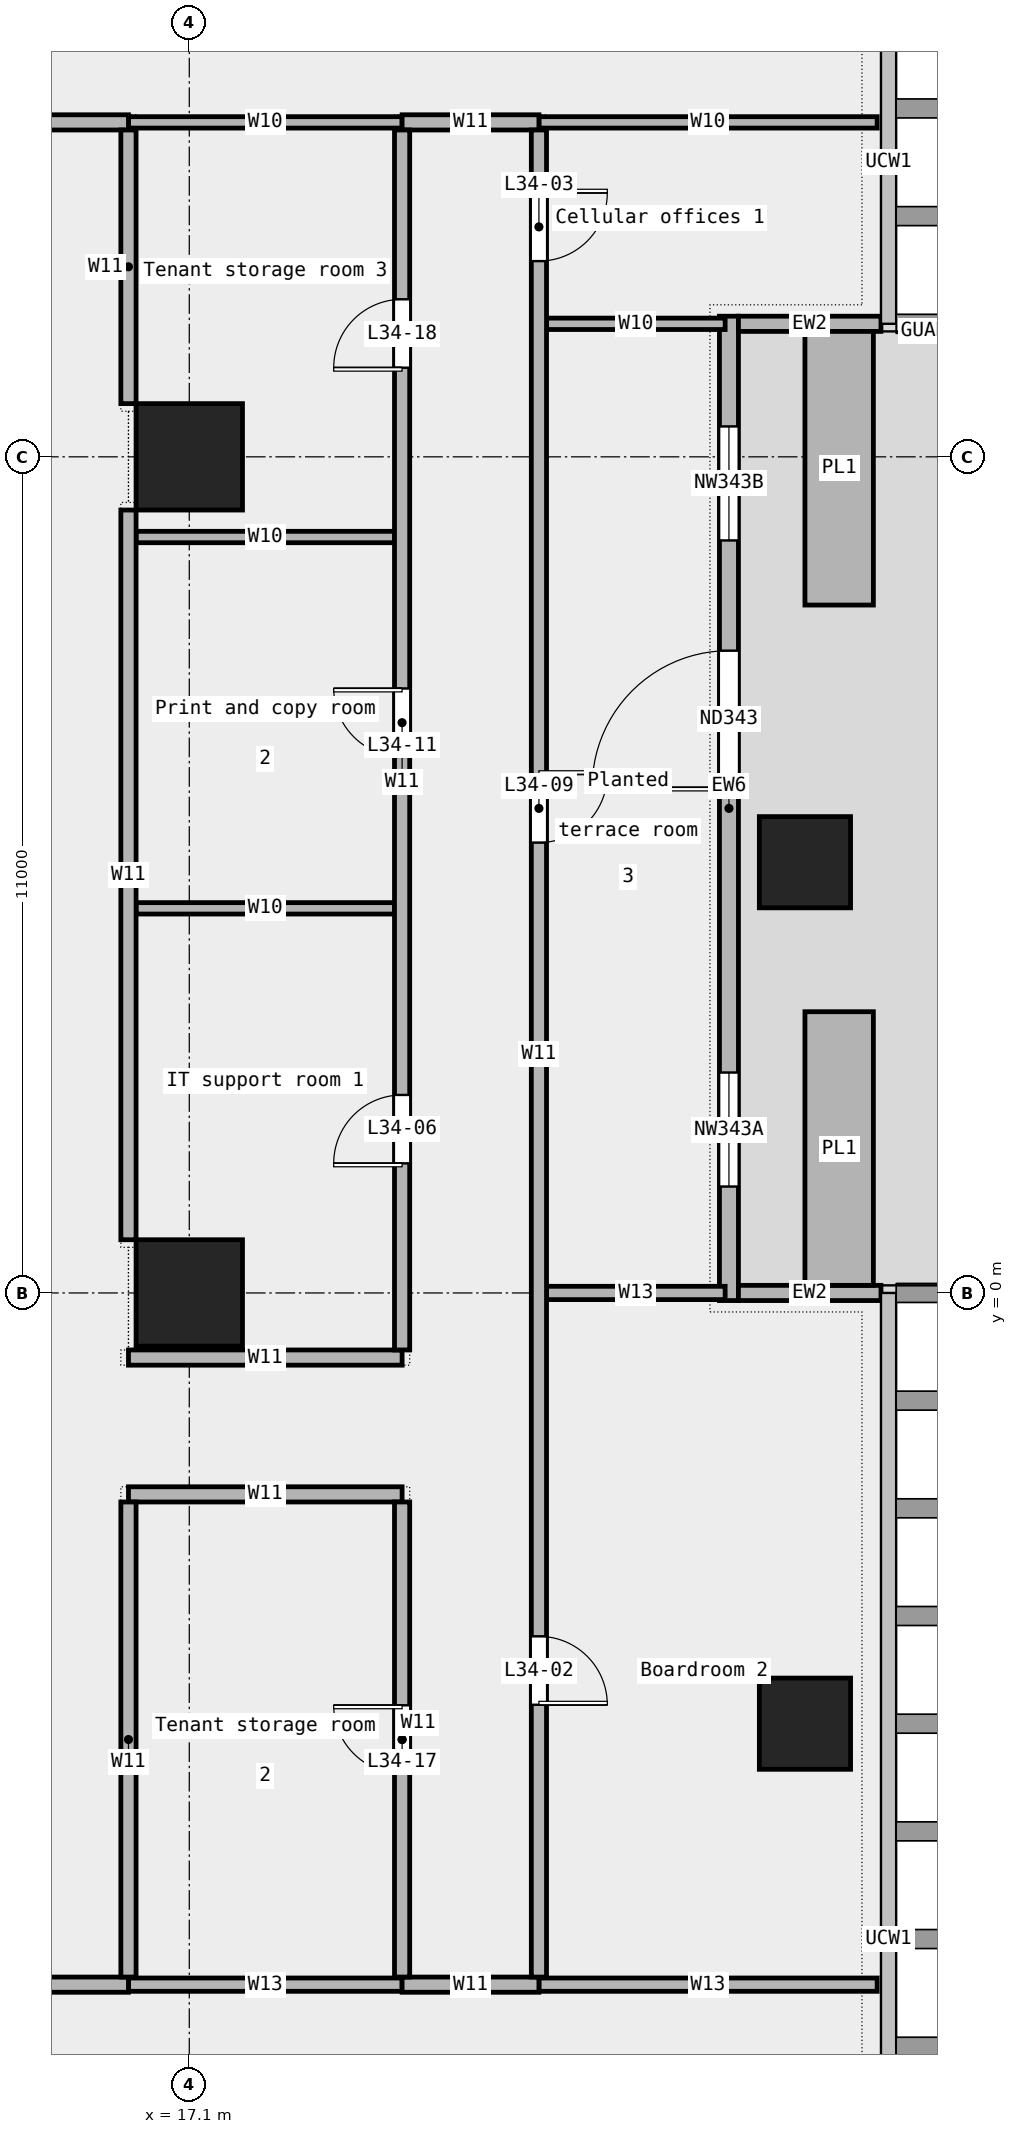
"""IFC4 building model, lengths in metres.
Left out: names, types, materials, properties, quantities, classifications, styles, units other than length and angle.
Written with IfcOpenShell. Run it as: python <this file> out.ifc"""

import sys

from ifc_helpers import new_model, si_unit, direction, frame, frame_2d, origin, origin_2d, place, context, subcontext, project, spatial, rectangle, extrude, element, fill, save


model = new_model("IFC4")
c1 = context("Model", 3, precision=1e-05, world=origin(), true_north=direction((0.0, 1.0)))
c2 = subcontext(c1, "Body", "Model", "MODEL_VIEW")
j1 = project(units=[si_unit("LENGTHUNIT", "METRE"), si_unit("PLANEANGLEUNIT", "RADIAN")], contexts=[c1])
p1 = place(None, origin())
s1 = spatial("IfcSite", under=j1, at=p1, CompositionType="ELEMENT")
p2 = place(p1, origin())
s2 = spatial("IfcBuilding", under=s1, at=p2, CompositionType="ELEMENT")
p3 = place(p2, frame((0.0, 0.0, 169.0)))
s3 = spatial("IfcBuildingStorey", under=s2, at=p3, CompositionType="ELEMENT", Elevation=169.0)
for number, where, z_axis, x_axis in (
    (1, (25.2, -5.667, 0.0), (0.0, 0.0, 1.0), (1.0, 0.0, 0.0)),
    (2, (25.2, 5.667, 0.0), (0.0, 0.0, 1.0), (1.0, 0.0, 0.0)),
):
    element("IfcColumn", number, at=place(p3, frame(where, z_axis=z_axis, x_axis=x_axis)), inside=s3, PredefinedType="COLUMN", context=c2, shape_type="SweptSolid", body=[
        extrude(rectangle(XDim=1.2, YDim=1.2, at=origin_2d()), origin(), (0.0, 0.0, 1.0), 3.6),
    ])
for number, where, z_axis, x_axis in (
    (3, (17.1, 0.0, 0.0), (0.0, 0.0, 1.0), (1.0, 0.0, 0.0)),
    (4, (17.1, 11.0, 0.0), (0.0, 0.0, 1.0), (1.0, 0.0, 0.0)),
):
    element("IfcColumn", number, at=place(p3, frame(where, z_axis=z_axis, x_axis=x_axis)), inside=s3, PredefinedType="COLUMN", context=c2, shape_type="SweptSolid", body=[
        extrude(rectangle(XDim=1.4, YDim=1.4, at=origin_2d()), origin(), (0.0, 0.0, 1.0), 3.6),
    ])
p4 = place(p3, frame((24.2, -0.1, 0.0), z_axis=(0.0, 0.0, 1.0), x_axis=(0.0, 1.0, 0.0)))
e5 = element("IfcWall", 5, at=p4, inside=s3, PredefinedType="STANDARD", context=c2, shape_type="SweptSolid", body=[
    extrude(rectangle(XDim=12.95, YDim=0.25, at=frame_2d((6.475, 0.0))), origin(), (0.0, 0.0, 1.0), 3.6),
])
p5 = place(p4, frame((1.5, 0.0, 0.45)))
e6 = element("IfcOpeningElement", 6, at=p5, cuts=e5, PredefinedType="OPENING", context=c2, shape_type="SweptSolid", body=[
    extrude(rectangle(XDim=1.5, YDim=2.4, at=frame_2d((0.75, 1.2))), frame((0.0, 0.137, 0.0), z_axis=(0.0, -1.0, 0.0), x_axis=(1.0, 0.0, 0.0)), (0.0, 0.0, 1.0), 0.274),
])
p6 = place(p4, frame((6.75, 0.0, 0.0)))
e7 = element("IfcOpeningElement", 7, at=p6, cuts=e5, PredefinedType="OPENING", context=c2, shape_type="SweptSolid", body=[
    extrude(rectangle(XDim=1.8, YDim=2.4, at=frame_2d((0.9, 1.2))), frame((0.0, 0.137, 0.0), z_axis=(0.0, -1.0, 0.0), x_axis=(1.0, 0.0, 0.0)), (0.0, 0.0, 1.0), 0.274),
])
p7 = place(p4, frame((10.0, 0.0, 0.45)))
e8 = element("IfcOpeningElement", 8, at=p7, cuts=e5, PredefinedType="OPENING", context=c2, shape_type="SweptSolid", body=[
    extrude(rectangle(XDim=1.5, YDim=2.4, at=frame_2d((0.75, 1.2))), frame((0.0, 0.137, 0.0), z_axis=(0.0, -1.0, 0.0), x_axis=(1.0, 0.0, 0.0)), (0.0, 0.0, 1.0), 0.274),
])
for number, where, z_axis, x_axis in (
    (9, (26.2, 0.0, 0.0), (0.0, 0.0, 1.0), (-1.0, 0.0, 0.0)),
    (10, (26.2, 12.75, 0.0), (0.0, 0.0, 1.0), (-1.0, 0.0, 0.0)),
):
    element("IfcWall", number, at=place(p3, frame(where, z_axis=z_axis, x_axis=x_axis)), inside=s3, PredefinedType="STANDARD", context=c2, shape_type="SweptSolid", body=[
        extrude(rectangle(XDim=1.875, YDim=0.2, at=frame_2d((0.938, 0.0))), origin(), (0.0, 0.0, 1.0), 3.6),
    ])
for number, where, z_axis, x_axis in (
    (11, (25.65, 0.1, 0.0), (0.0, 0.0, 1.0), (0.0, 1.0, 0.0)),
    (12, (25.65, 9.05, 0.0), (0.0, 0.0, 1.0), (0.0, 1.0, 0.0)),
):
    element("IfcWall", number, at=place(p3, frame(where, z_axis=z_axis, x_axis=x_axis)), inside=s3, PredefinedType="STANDARD", context=c2, shape_type="SweptSolid", body=[
        extrude(rectangle(XDim=3.6, YDim=0.9, at=frame_2d((1.8, 0.0))), origin(), (0.0, 0.0, 1.0), 0.7),
    ])
p8 = place(p3, frame((16.3, -9.1, 0.0), z_axis=(0.0, 0.0, 1.0), x_axis=(1.0, 0.0, 0.0)))
e13 = element("IfcWall", 13, at=p8, inside=s3, PredefinedType="PARTITIONING", context=c2, shape_type="SweptSolid", body=[
    extrude(rectangle(XDim=3.6, YDim=0.175, at=frame_2d((1.8, 0.0))), origin(), (0.0, 0.0, 1.0), 3.6),
])
p9 = place(p3, frame((21.7, -9.1, 0.0), z_axis=(0.0, 0.0, 1.0), x_axis=(1.0, 0.0, 0.0)))
e14 = element("IfcWall", 14, at=p9, inside=s3, PredefinedType="PARTITIONING", context=c2, shape_type="SweptSolid", body=[
    extrude(rectangle(XDim=4.45, YDim=0.175, at=frame_2d((2.225, 0.0))), origin(), (0.0, 0.0, 1.0), 3.6),
])
p10 = place(p3, frame((-3.04, -9.1, 0.0), z_axis=(0.0, 0.0, 1.0), x_axis=(1.0, 0.0, 0.0)))
e15 = element("IfcWall", 15, at=p10, inside=s3, PredefinedType="PARTITIONING", context=c2, shape_type="SweptSolid", body=[
    extrude(rectangle(XDim=19.34, YDim=0.2, at=frame_2d((9.67, 0.0))), origin(), (0.0, 0.0, 1.0), 3.6),
])
p11 = place(p10, frame((5.942, 0.0, 0.0)))
e16 = element("IfcOpeningElement", 16, at=p11, cuts=e15, PredefinedType="OPENING", context=c2, shape_type="SweptSolid", body=[
    extrude(rectangle(XDim=1.0, YDim=2.1, at=frame_2d((0.5, 1.05))), frame((0.0, 0.112, 0.0), z_axis=(0.0, -1.0, 0.0), x_axis=(1.0, 0.0, 0.0)), (0.0, 0.0, 1.0), 0.224),
])
p12 = place(p3, frame((19.9, -9.1, 0.0), z_axis=(0.0, 0.0, 1.0), x_axis=(1.0, 0.0, 0.0)))
e17 = element("IfcWall", 17, at=p12, inside=s3, PredefinedType="PARTITIONING", context=c2, shape_type="SweptSolid", body=[
    extrude(rectangle(XDim=1.8, YDim=0.2, at=frame_2d((0.9, 0.0))), origin(), (0.0, 0.0, 1.0), 3.6),
])
for number, where, z_axis, x_axis in (
    (18, (16.3, -2.65, 0.0), (0.0, 0.0, 1.0), (1.0, 0.0, 0.0)),
    (19, (16.3, -0.85, 0.0), (0.0, 0.0, 1.0), (1.0, 0.0, 0.0)),
):
    element("IfcWall", number, at=place(p3, frame(where, z_axis=z_axis, x_axis=x_axis)), inside=s3, PredefinedType="PARTITIONING", context=c2, shape_type="SweptSolid", body=[
        extrude(rectangle(XDim=3.6, YDim=0.2, at=frame_2d((1.8, 0.0))), origin(), (0.0, 0.0, 1.0), 3.6),
    ])
p13 = place(p3, frame((21.8, 0.0, 0.0), z_axis=(0.0, 0.0, 1.0), x_axis=(1.0, 0.0, 0.0)))
e20 = element("IfcWall", 20, at=p13, inside=s3, PredefinedType="PARTITIONING", context=c2, shape_type="SweptSolid", body=[
    extrude(rectangle(XDim=2.35, YDim=0.175, at=frame_2d((1.175, 0.0))), origin(), (0.0, 0.0, 1.0), 3.6),
])
for number, where, z_axis, x_axis in (
    (21, (16.4, 5.06, 0.0), (0.0, 0.0, 1.0), (1.0, 0.0, 0.0)),
    (22, (16.4, 9.945, 0.0), (0.0, 0.0, 1.0), (1.0, 0.0, 0.0)),
):
    element("IfcWall", number, at=place(p3, frame(where, z_axis=z_axis, x_axis=x_axis)), inside=s3, PredefinedType="PARTITIONING", context=c2, shape_type="SweptSolid", body=[
        extrude(rectangle(XDim=3.4, YDim=0.15, at=frame_2d((1.7, 0.0))), origin(), (0.0, 0.0, 1.0), 3.6),
    ])
p14 = place(p3, frame((21.8, 12.75, 0.0), z_axis=(0.0, 0.0, 1.0), x_axis=(1.0, 0.0, 0.0)))
e23 = element("IfcWall", 23, at=p14, inside=s3, PredefinedType="PARTITIONING", context=c2, shape_type="SweptSolid", body=[
    extrude(rectangle(XDim=2.35, YDim=0.15, at=frame_2d((1.175, 0.0))), origin(), (0.0, 0.0, 1.0), 3.6),
])
p15 = place(p3, frame((16.3, 15.4, 0.0), z_axis=(0.0, 0.0, 1.0), x_axis=(1.0, 0.0, 0.0)))
e24 = element("IfcWall", 24, at=p15, inside=s3, PredefinedType="PARTITIONING", context=c2, shape_type="SweptSolid", body=[
    extrude(rectangle(XDim=3.6, YDim=0.15, at=frame_2d((1.8, 0.0))), origin(), (0.0, 0.0, 1.0), 3.6),
])
p16 = place(p3, frame((21.7, 15.4, 0.0), z_axis=(0.0, 0.0, 1.0), x_axis=(1.0, 0.0, 0.0)))
e25 = element("IfcWall", 25, at=p16, inside=s3, PredefinedType="PARTITIONING", context=c2, shape_type="SweptSolid", body=[
    extrude(rectangle(XDim=4.45, YDim=0.15, at=frame_2d((2.225, 0.0))), origin(), (0.0, 0.0, 1.0), 3.6),
])
p17 = place(p3, frame((-16.3, 15.4, 0.0), z_axis=(0.0, 0.0, 1.0), x_axis=(1.0, 0.0, 0.0)))
e26 = element("IfcWall", 26, at=p17, inside=s3, PredefinedType="PARTITIONING", context=c2, shape_type="SweptSolid", body=[
    extrude(rectangle(XDim=32.6, YDim=0.2, at=frame_2d((16.3, 0.0))), origin(), (0.0, 0.0, 1.0), 3.6),
])
p18 = place(p17, frame((24.415, 0.0, 0.0)))
e27 = element("IfcOpeningElement", 27, at=p18, cuts=e26, PredefinedType="OPENING", context=c2, shape_type="SweptSolid", body=[
    extrude(rectangle(XDim=1.8, YDim=2.1, at=frame_2d((0.9, 1.05))), frame((0.0, 0.112, 0.0), z_axis=(0.0, -1.0, 0.0), x_axis=(1.0, 0.0, 0.0)), (0.0, 0.0, 1.0), 0.224),
])
p19 = place(p17, frame((12.24, 0.0, 0.0)))
e28 = element("IfcOpeningElement", 28, at=p19, cuts=e26, PredefinedType="OPENING", context=c2, shape_type="SweptSolid", body=[
    extrude(rectangle(XDim=1.2, YDim=2.1, at=frame_2d((0.6, 1.05))), frame((0.0, 0.112, 0.0), z_axis=(0.0, -1.0, 0.0), x_axis=(1.0, 0.0, 0.0)), (0.0, 0.0, 1.0), 0.224),
])
p20 = place(p17, frame((3.075, 0.0, 0.0)))
e29 = element("IfcOpeningElement", 29, at=p20, cuts=e26, PredefinedType="OPENING", context=c2, shape_type="SweptSolid", body=[
    extrude(rectangle(XDim=1.5, YDim=2.1, at=frame_2d((0.75, 1.05))), frame((0.0, 0.112, 0.0), z_axis=(0.0, -1.0, 0.0), x_axis=(1.0, 0.0, 0.0)), (0.0, 0.0, 1.0), 0.224),
])
p21 = place(p3, frame((19.9, 15.4, 0.0), z_axis=(0.0, 0.0, 1.0), x_axis=(1.0, 0.0, 0.0)))
e30 = element("IfcWall", 30, at=p21, inside=s3, PredefinedType="PARTITIONING", context=c2, shape_type="SweptSolid", body=[
    extrude(rectangle(XDim=1.8, YDim=0.2, at=frame_2d((0.9, 0.0))), origin(), (0.0, 0.0, 1.0), 3.6),
])
p22 = place(p3, frame((16.3, -9.0, 0.0), z_axis=(0.0, 0.0, 1.0), x_axis=(0.0, 1.0, 0.0)))
e31 = element("IfcWall", 31, at=p22, inside=s3, PredefinedType="PARTITIONING", context=c2, shape_type="SweptSolid", body=[
    extrude(rectangle(XDim=6.25, YDim=0.2, at=frame_2d((3.125, 0.0))), origin(), (0.0, 0.0, 1.0), 3.6),
])
p23 = place(p3, frame((16.3, 0.7, 0.0), z_axis=(0.0, 0.0, 1.0), x_axis=(0.0, 1.0, 0.0)))
e32 = element("IfcWall", 32, at=p23, inside=s3, PredefinedType="PARTITIONING", context=c2, shape_type="SweptSolid", body=[
    extrude(rectangle(XDim=9.6, YDim=0.2, at=frame_2d((4.8, 0.0))), origin(), (0.0, 0.0, 1.0), 3.6),
])
p24 = place(p3, frame((16.3, 11.7, 0.0), z_axis=(0.0, 0.0, 1.0), x_axis=(0.0, 1.0, 0.0)))
e33 = element("IfcWall", 33, at=p24, inside=s3, PredefinedType="PARTITIONING", context=c2, shape_type="SweptSolid", body=[
    extrude(rectangle(XDim=3.6, YDim=0.2, at=frame_2d((1.8, 0.0))), origin(), (0.0, 0.0, 1.0), 3.6),
])
p25 = place(p3, frame((19.9, -9.0, 0.0), z_axis=(0.0, 0.0, 1.0), x_axis=(0.0, 1.0, 0.0)))
e34 = element("IfcWall", 34, at=p25, inside=s3, PredefinedType="PARTITIONING", context=c2, shape_type="SweptSolid", body=[
    extrude(rectangle(XDim=6.25, YDim=0.2, at=frame_2d((3.125, 0.0))), origin(), (0.0, 0.0, 1.0), 3.6),
])
p26 = place(p25, frame((2.675, 0.0, 0.0)))
e35 = element("IfcOpeningElement", 35, at=p26, cuts=e34, PredefinedType="OPENING", context=c2, shape_type="SweptSolid", body=[
    extrude(rectangle(XDim=0.9, YDim=2.1, at=frame_2d((0.45, 1.05))), frame((0.0, 0.112, 0.0), z_axis=(0.0, -1.0, 0.0), x_axis=(1.0, 0.0, 0.0)), (0.0, 0.0, 1.0), 0.224),
])
p27 = place(p3, frame((19.9, -0.75, 0.0), z_axis=(0.0, 0.0, 1.0), x_axis=(0.0, 1.0, 0.0)))
e36 = element("IfcWall", 36, at=p27, inside=s3, PredefinedType="PARTITIONING", context=c2, shape_type="SweptSolid", body=[
    extrude(rectangle(XDim=16.05, YDim=0.2, at=frame_2d((8.025, 0.0))), origin(), (0.0, 0.0, 1.0), 3.6),
])
p28 = place(p27, frame((2.455, 0.0, 0.0)))
e37 = element("IfcOpeningElement", 37, at=p28, cuts=e36, PredefinedType="OPENING", context=c2, shape_type="SweptSolid", body=[
    extrude(rectangle(XDim=0.9, YDim=2.1, at=frame_2d((0.45, 1.05))), frame((0.0, 0.112, 0.0), z_axis=(0.0, -1.0, 0.0), x_axis=(1.0, 0.0, 0.0)), (0.0, 0.0, 1.0), 0.224),
])
p29 = place(p27, frame((7.802, 0.0, 0.0)))
e38 = element("IfcOpeningElement", 38, at=p29, cuts=e36, PredefinedType="OPENING", context=c2, shape_type="SweptSolid", body=[
    extrude(rectangle(XDim=0.9, YDim=2.1, at=frame_2d((0.45, 1.05))), frame((0.0, 0.112, 0.0), z_axis=(0.0, -1.0, 0.0), x_axis=(1.0, 0.0, 0.0)), (0.0, 0.0, 1.0), 0.224),
])
p30 = place(p27, frame((12.923, 0.0, 0.0)))
e39 = element("IfcOpeningElement", 39, at=p30, cuts=e36, PredefinedType="OPENING", context=c2, shape_type="SweptSolid", body=[
    extrude(rectangle(XDim=0.9, YDim=2.1, at=frame_2d((0.45, 1.05))), frame((0.0, 0.112, 0.0), z_axis=(0.0, -1.0, 0.0), x_axis=(1.0, 0.0, 0.0)), (0.0, 0.0, 1.0), 0.224),
])
p31 = place(p3, frame((21.7, -9.0, 0.0), z_axis=(0.0, 0.0, 1.0), x_axis=(0.0, 1.0, 0.0)))
e40 = element("IfcWall", 40, at=p31, inside=s3, PredefinedType="PARTITIONING", context=c2, shape_type="SweptSolid", body=[
    extrude(rectangle(XDim=24.3, YDim=0.2, at=frame_2d((12.15, 0.0))), origin(), (0.0, 0.0, 1.0), 3.6),
])
p32 = place(p31, frame((3.583, 0.0, 0.0)))
e41 = element("IfcOpeningElement", 41, at=p32, cuts=e40, PredefinedType="OPENING", context=c2, shape_type="SweptSolid", body=[
    extrude(rectangle(XDim=0.9, YDim=2.1, at=frame_2d((0.45, 1.05))), frame((0.0, 0.112, 0.0), z_axis=(0.0, -1.0, 0.0), x_axis=(1.0, 0.0, 0.0)), (0.0, 0.0, 1.0), 0.224),
])
p33 = place(p31, frame((22.575, 0.0, 0.0)))
e42 = element("IfcOpeningElement", 42, at=p33, cuts=e40, PredefinedType="OPENING", context=c2, shape_type="SweptSolid", body=[
    extrude(rectangle(XDim=0.9, YDim=2.1, at=frame_2d((0.45, 1.05))), frame((0.0, 0.112, 0.0), z_axis=(0.0, -1.0, 0.0), x_axis=(1.0, 0.0, 0.0)), (0.0, 0.0, 1.0), 0.224),
])
p34 = place(p31, frame((14.925, 0.0, 0.0)))
e43 = element("IfcOpeningElement", 43, at=p34, cuts=e40, PredefinedType="OPENING", context=c2, shape_type="SweptSolid", body=[
    extrude(rectangle(XDim=0.9, YDim=2.1, at=frame_2d((0.45, 1.05))), frame((0.0, 0.112, 0.0), z_axis=(0.0, -1.0, 0.0), x_axis=(1.0, 0.0, 0.0)), (0.0, 0.0, 1.0), 0.224),
])
p35 = place(p5, origin())
e44 = element("IfcWindow", 44, at=p35, inside=s3, PartitioningType="SINGLE_PANEL", PredefinedType="WINDOW", context=c2, shape_type="SweptSolid", body=[
    extrude(rectangle(XDim=1.5, YDim=2.4, at=frame_2d((0.75, 1.2))), frame((0.0, 0.03, 0.0), z_axis=(0.0, -1.0, 0.0), x_axis=(1.0, 0.0, 0.0)), (0.0, 0.0, 1.0), 0.06),
])
fill(e6, e44)
p36 = place(p6, origin())
e45 = element("IfcDoor", 45, at=p36, inside=s3, OperationType="DOUBLE_DOOR_SINGLE_SWING", PredefinedType="DOOR", context=c2, shape_type="SweptSolid", body=[
    extrude(rectangle(XDim=1.8, YDim=2.4, at=frame_2d((0.9, 1.2))), frame((0.0, 0.025, 0.0), z_axis=(0.0, -1.0, 0.0), x_axis=(1.0, 0.0, 0.0)), (0.0, 0.0, 1.0), 0.05),
])
fill(e7, e45)
p37 = place(p7, origin())
e46 = element("IfcWindow", 46, at=p37, inside=s3, PartitioningType="SINGLE_PANEL", PredefinedType="WINDOW", context=c2, shape_type="SweptSolid", body=[
    extrude(rectangle(XDim=1.5, YDim=2.4, at=frame_2d((0.75, 1.2))), frame((0.0, 0.03, 0.0), z_axis=(0.0, -1.0, 0.0), x_axis=(1.0, 0.0, 0.0)), (0.0, 0.0, 1.0), 0.06),
])
fill(e8, e46)
p38 = place(p32, origin())
e47 = element("IfcDoor", 47, at=p38, inside=s3, OperationType="SINGLE_SWING_RIGHT", PredefinedType="DOOR", context=c2, shape_type="SweptSolid", body=[
    extrude(rectangle(XDim=0.9, YDim=2.1, at=frame_2d((0.45, 1.05))), frame((0.0, 0.025, 0.0), z_axis=(0.0, -1.0, 0.0), x_axis=(1.0, 0.0, 0.0)), (0.0, 0.0, 1.0), 0.05),
])
fill(e41, e47)
p39 = place(p33, origin())
e48 = element("IfcDoor", 48, at=p39, inside=s3, OperationType="SINGLE_SWING_LEFT", PredefinedType="DOOR", context=c2, shape_type="SweptSolid", body=[
    extrude(rectangle(XDim=0.9, YDim=2.1, at=frame_2d((0.45, 1.05))), frame((0.0, 0.025, 0.0), z_axis=(0.0, -1.0, 0.0), x_axis=(1.0, 0.0, 0.0)), (0.0, 0.0, 1.0), 0.05),
])
fill(e42, e48)
p40 = place(p28, origin())
e49 = element("IfcDoor", 49, at=p40, inside=s3, OperationType="SINGLE_SWING_LEFT", PredefinedType="DOOR", context=c2, shape_type="SweptSolid", body=[
    extrude(rectangle(XDim=0.9, YDim=2.1, at=frame_2d((0.45, 1.05))), frame((0.0, 0.025, 0.0), z_axis=(0.0, -1.0, 0.0), x_axis=(1.0, 0.0, 0.0)), (0.0, 0.0, 1.0), 0.05),
])
fill(e37, e49)
p41 = place(p34, origin())
e50 = element("IfcDoor", 50, at=p41, inside=s3, OperationType="SINGLE_SWING_LEFT", PredefinedType="DOOR", context=c2, shape_type="SweptSolid", body=[
    extrude(rectangle(XDim=0.9, YDim=2.1, at=frame_2d((0.45, 1.05))), frame((0.0, 0.025, 0.0), z_axis=(0.0, -1.0, 0.0), x_axis=(1.0, 0.0, 0.0)), (0.0, 0.0, 1.0), 0.05),
])
fill(e43, e50)
p42 = place(p29, origin())
e51 = element("IfcDoor", 51, at=p42, inside=s3, OperationType="SINGLE_SWING_RIGHT", PredefinedType="DOOR", context=c2, shape_type="SweptSolid", body=[
    extrude(rectangle(XDim=0.9, YDim=2.1, at=frame_2d((0.45, 1.05))), frame((0.0, 0.025, 0.0), z_axis=(0.0, -1.0, 0.0), x_axis=(1.0, 0.0, 0.0)), (0.0, 0.0, 1.0), 0.05),
])
fill(e38, e51)
p43 = place(p26, origin())
e52 = element("IfcDoor", 52, at=p43, inside=s3, OperationType="SINGLE_SWING_RIGHT", PredefinedType="DOOR", context=c2, shape_type="SweptSolid", body=[
    extrude(rectangle(XDim=0.9, YDim=2.1, at=frame_2d((0.45, 1.05))), frame((0.0, 0.025, 0.0), z_axis=(0.0, -1.0, 0.0), x_axis=(1.0, 0.0, 0.0)), (0.0, 0.0, 1.0), 0.05),
])
fill(e35, e52)
p44 = place(p30, origin())
e53 = element("IfcDoor", 53, at=p44, inside=s3, OperationType="SINGLE_SWING_LEFT", PredefinedType="DOOR", context=c2, shape_type="SweptSolid", body=[
    extrude(rectangle(XDim=0.9, YDim=2.1, at=frame_2d((0.45, 1.05))), frame((0.0, 0.025, 0.0), z_axis=(0.0, -1.0, 0.0), x_axis=(1.0, 0.0, 0.0)), (0.0, 0.0, 1.0), 0.05),
])
fill(e39, e53)
save(model, sys.argv[1])
